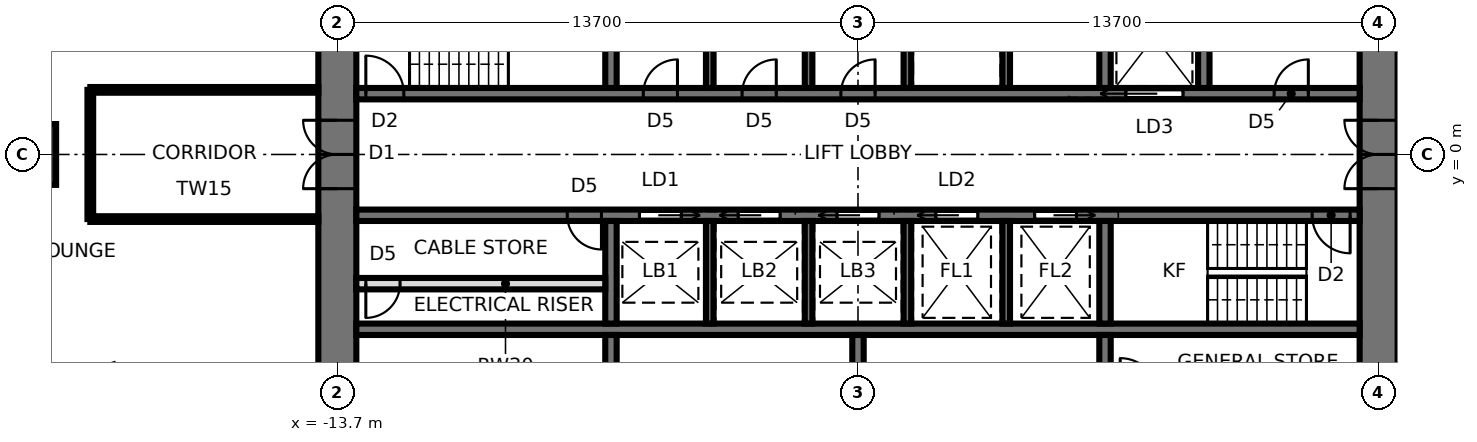
"""IFC4 building model, lengths in metres.
Left out: names, types, materials, properties, quantities, classifications, styles, units other than length and angle.
Written with IfcOpenShell. Run it as: python <this file> out.ifc"""

import sys

from ifc_helpers import new_model, si_unit, direction, frame, frame_2d, origin, origin_2d, place, context, subcontext, project, spatial, rectangle, extrude, element, fill, save


model = new_model("IFC4")
c1 = context("Model", 3, precision=1e-05, world=origin(), true_north=direction((0.0, 1.0)))
c2 = subcontext(c1, "Body", "Model", "MODEL_VIEW")
j1 = project(units=[si_unit("LENGTHUNIT", "METRE"), si_unit("PLANEANGLEUNIT", "RADIAN")], contexts=[c1])
p1 = place(None, origin())
s1 = spatial("IfcSite", under=j1, at=p1, CompositionType="ELEMENT")
p2 = place(p1, origin())
s2 = spatial("IfcBuilding", under=s1, at=p2, CompositionType="ELEMENT")
p3 = place(p2, frame((0.0, 0.0, 162.6)))
s3 = spatial("IfcBuildingStorey", under=s2, at=p3, CompositionType="ELEMENT", Elevation=162.6)
p4 = place(p3, frame((-21.9, 0.0, 0.0), z_axis=(0.0, 0.0, 1.0), x_axis=(-1.0, 0.0, 0.0)))
e1 = element("IfcColumn", 1, at=p4, inside=s3, PredefinedType="COLUMN", context=c2, shape_type="SweptSolid", body=[
    extrude(rectangle(XDim=1.6, YDim=1.6, at=origin_2d()), origin(), (0.0, 0.0, 1.0), 3.9),
])
p5 = place(p3, frame((13.7, -9.5, 0.0), z_axis=(0.0, 0.0, 1.0), x_axis=(0.0, 1.0, 0.0)))
e2 = element("IfcWall", 2, at=p5, inside=s3, PredefinedType="SHEAR", context=c2, shape_type="SweptSolid", body=[
    extrude(rectangle(XDim=19.0, YDim=1.0, at=frame_2d((9.5, 0.0))), origin(), (0.0, 0.0, 1.0), 3.9),
])
p6 = place(p5, frame((8.6, 0.0, 0.0)))
e3 = element("IfcOpeningElement", 3, at=p6, cuts=e2, PredefinedType="OPENING", context=c2, shape_type="SweptSolid", body=[
    extrude(rectangle(XDim=1.8, YDim=2.4, at=frame_2d((0.9, 1.2))), frame((0.0, 0.51, 0.0), z_axis=(0.0, -1.0, 0.0), x_axis=(1.0, 0.0, 0.0)), (0.0, 0.0, 1.0), 1.02),
])
p7 = place(p3, frame((-13.7, 9.5, 0.0), z_axis=(0.0, 0.0, 1.0), x_axis=(0.0, -1.0, 0.0)))
e4 = element("IfcWall", 4, at=p7, inside=s3, PredefinedType="SHEAR", context=c2, shape_type="SweptSolid", body=[
    extrude(rectangle(XDim=19.0, YDim=1.0, at=frame_2d((9.5, 0.0))), origin(), (0.0, 0.0, 1.0), 3.9),
])
p8 = place(p7, frame((8.6, 0.0, 0.0)))
e5 = element("IfcOpeningElement", 5, at=p8, cuts=e4, PredefinedType="OPENING", context=c2, shape_type="SweptSolid", body=[
    extrude(rectangle(XDim=1.8, YDim=2.4, at=frame_2d((0.9, 1.2))), frame((0.0, 0.51, 0.0), z_axis=(0.0, -1.0, 0.0), x_axis=(1.0, 0.0, 0.0)), (0.0, 0.0, 1.0), 1.02),
])
p9 = place(p3, frame((-13.2, 1.6, 0.0), z_axis=(0.0, 0.0, 1.0), x_axis=(1.0, 0.0, 0.0)))
e6 = element("IfcWall", 6, at=p9, inside=s3, PredefinedType="SHEAR", context=c2, shape_type="SweptSolid", body=[
    extrude(rectangle(XDim=26.4, YDim=0.3, at=frame_2d((13.2, 0.0))), origin(), (0.0, 0.0, 1.0), 3.9),
])
p10 = place(p9, frame((0.25, 0.0, 0.0)))
e7 = element("IfcOpeningElement", 7, at=p10, cuts=e6, PredefinedType="OPENING", context=c2, shape_type="SweptSolid", body=[
    extrude(rectangle(XDim=1.0, YDim=2.1, at=frame_2d((0.5, 1.05))), frame((0.0, 0.16, 0.0), z_axis=(0.0, -1.0, 0.0), x_axis=(1.0, 0.0, 0.0)), (0.0, 0.0, 1.0), 0.32),
])
p11 = place(p9, frame((20.25, 0.0, 0.0)))
e8 = element("IfcOpeningElement", 8, at=p11, cuts=e6, PredefinedType="OPENING", context=c2, shape_type="SweptSolid", body=[
    extrude(rectangle(XDim=1.5, YDim=2.4, at=frame_2d((0.75, 1.2))), frame((0.0, 0.16, 0.0), z_axis=(0.0, -1.0, 0.0), x_axis=(1.0, 0.0, 0.0)), (0.0, 0.0, 1.0), 0.32),
])
p12 = place(p9, frame((7.55, 0.0, 0.0)))
e9 = element("IfcOpeningElement", 9, at=p12, cuts=e6, PredefinedType="OPENING", context=c2, shape_type="SweptSolid", body=[
    extrude(rectangle(XDim=0.9, YDim=2.1, at=frame_2d((0.45, 1.05))), frame((0.0, 0.16, 0.0), z_axis=(0.0, -1.0, 0.0), x_axis=(1.0, 0.0, 0.0)), (0.0, 0.0, 1.0), 0.32),
])
p13 = place(p9, frame((10.15, 0.0, 0.0)))
e10 = element("IfcOpeningElement", 10, at=p13, cuts=e6, PredefinedType="OPENING", context=c2, shape_type="SweptSolid", body=[
    extrude(rectangle(XDim=0.9, YDim=2.1, at=frame_2d((0.45, 1.05))), frame((0.0, 0.16, 0.0), z_axis=(0.0, -1.0, 0.0), x_axis=(1.0, 0.0, 0.0)), (0.0, 0.0, 1.0), 0.32),
])
p14 = place(p9, frame((12.75, 0.0, 0.0)))
e11 = element("IfcOpeningElement", 11, at=p14, cuts=e6, PredefinedType="OPENING", context=c2, shape_type="SweptSolid", body=[
    extrude(rectangle(XDim=0.9, YDim=2.1, at=frame_2d((0.45, 1.05))), frame((0.0, 0.16, 0.0), z_axis=(0.0, -1.0, 0.0), x_axis=(1.0, 0.0, 0.0)), (0.0, 0.0, 1.0), 0.32),
])
p15 = place(p9, frame((24.15, 0.0, 0.0)))
e12 = element("IfcOpeningElement", 12, at=p15, cuts=e6, PredefinedType="OPENING", context=c2, shape_type="SweptSolid", body=[
    extrude(rectangle(XDim=0.9, YDim=2.1, at=frame_2d((0.45, 1.05))), frame((0.0, 0.16, 0.0), z_axis=(0.0, -1.0, 0.0), x_axis=(1.0, 0.0, 0.0)), (0.0, 0.0, 1.0), 0.32),
])
p16 = place(p3, frame((-13.2, -1.6, 0.0), z_axis=(0.0, 0.0, 1.0), x_axis=(1.0, 0.0, 0.0)))
e13 = element("IfcWall", 13, at=p16, inside=s3, PredefinedType="SHEAR", context=c2, shape_type="SweptSolid", body=[
    extrude(rectangle(XDim=26.4, YDim=0.3, at=frame_2d((13.2, 0.0))), origin(), (0.0, 0.0, 1.0), 3.9),
])
p17 = place(p16, frame((25.15, 0.0, 0.0)))
e14 = element("IfcOpeningElement", 14, at=p17, cuts=e13, PredefinedType="OPENING", context=c2, shape_type="SweptSolid", body=[
    extrude(rectangle(XDim=1.0, YDim=2.1, at=frame_2d((0.5, 1.05))), frame((0.0, 0.16, 0.0), z_axis=(0.0, -1.0, 0.0), x_axis=(1.0, 0.0, 0.0)), (0.0, 0.0, 1.0), 0.32),
])
p18 = place(p16, frame((7.45, 0.0, 0.0)))
e15 = element("IfcOpeningElement", 15, at=p18, cuts=e13, PredefinedType="OPENING", context=c2, shape_type="SweptSolid", body=[
    extrude(rectangle(XDim=1.1, YDim=2.3, at=frame_2d((0.55, 1.15))), frame((0.0, 0.16, 0.0), z_axis=(0.0, -1.0, 0.0), x_axis=(1.0, 0.0, 0.0)), (0.0, 0.0, 1.0), 0.32),
])
p19 = place(p16, frame((10.05, 0.0, 0.0)))
e16 = element("IfcOpeningElement", 16, at=p19, cuts=e13, PredefinedType="OPENING", context=c2, shape_type="SweptSolid", body=[
    extrude(rectangle(XDim=1.1, YDim=2.3, at=frame_2d((0.55, 1.15))), frame((0.0, 0.16, 0.0), z_axis=(0.0, -1.0, 0.0), x_axis=(1.0, 0.0, 0.0)), (0.0, 0.0, 1.0), 0.32),
])
p20 = place(p16, frame((12.65, 0.0, 0.0)))
e17 = element("IfcOpeningElement", 17, at=p20, cuts=e13, PredefinedType="OPENING", context=c2, shape_type="SweptSolid", body=[
    extrude(rectangle(XDim=1.1, YDim=2.3, at=frame_2d((0.55, 1.15))), frame((0.0, 0.16, 0.0), z_axis=(0.0, -1.0, 0.0), x_axis=(1.0, 0.0, 0.0)), (0.0, 0.0, 1.0), 0.32),
])
p21 = place(p16, frame((15.25, 0.0, 0.0)))
e18 = element("IfcOpeningElement", 18, at=p21, cuts=e13, PredefinedType="OPENING", context=c2, shape_type="SweptSolid", body=[
    extrude(rectangle(XDim=1.1, YDim=2.3, at=frame_2d((0.55, 1.15))), frame((0.0, 0.16, 0.0), z_axis=(0.0, -1.0, 0.0), x_axis=(1.0, 0.0, 0.0)), (0.0, 0.0, 1.0), 0.32),
])
p22 = place(p16, frame((17.85, 0.0, 0.0)))
e19 = element("IfcOpeningElement", 19, at=p22, cuts=e13, PredefinedType="OPENING", context=c2, shape_type="SweptSolid", body=[
    extrude(rectangle(XDim=1.1, YDim=2.3, at=frame_2d((0.55, 1.15))), frame((0.0, 0.16, 0.0), z_axis=(0.0, -1.0, 0.0), x_axis=(1.0, 0.0, 0.0)), (0.0, 0.0, 1.0), 0.32),
])
p23 = place(p16, frame((5.55, 0.0, 0.0)))
e20 = element("IfcOpeningElement", 20, at=p23, cuts=e13, PredefinedType="OPENING", context=c2, shape_type="SweptSolid", body=[
    extrude(rectangle(XDim=0.9, YDim=2.1, at=frame_2d((0.45, 1.05))), frame((0.0, 0.16, 0.0), z_axis=(0.0, -1.0, 0.0), x_axis=(1.0, 0.0, 0.0)), (0.0, 0.0, 1.0), 0.32),
])
p24 = place(p3, frame((-13.2, -4.6, 0.0), z_axis=(0.0, 0.0, 1.0), x_axis=(1.0, 0.0, 0.0)))
e21 = element("IfcWall", 21, at=p24, inside=s3, PredefinedType="SHEAR", context=c2, shape_type="SweptSolid", body=[
    extrude(rectangle(XDim=26.4, YDim=0.3, at=frame_2d((13.2, 0.0))), origin(), (0.0, 0.0, 1.0), 3.9),
])
for number, where, z_axis, x_axis in (
    (22, (-6.5, 1.75, 0.0), (0.0, 0.0, 1.0), (0.0, 1.0, 0.0)),
    (23, (6.5, 1.75, 0.0), (0.0, 0.0, 1.0), (0.0, 1.0, 0.0)),
):
    element("IfcWall", number, at=place(p3, frame(where, z_axis=z_axis, x_axis=x_axis)), inside=s3, PredefinedType="SHEAR", context=c2, shape_type="SweptSolid", body=[
        extrude(rectangle(XDim=2.7, YDim=0.3, at=frame_2d((1.35, 0.0))), origin(), (0.0, 0.0, 1.0), 3.9),
    ])
for number, where, z_axis, x_axis in (
    (24, (-3.9, 1.75, 0.0), (0.0, 0.0, 1.0), (0.0, 1.0, 0.0)),
    (25, (-1.3, 1.75, 0.0), (0.0, 0.0, 1.0), (0.0, 1.0, 0.0)),
    (26, (1.3, 1.75, 0.0), (0.0, 0.0, 1.0), (0.0, 1.0, 0.0)),
    (27, (3.9, 1.75, 0.0), (0.0, 0.0, 1.0), (0.0, 1.0, 0.0)),
):
    element("IfcWall", number, at=place(p3, frame(where, z_axis=z_axis, x_axis=x_axis)), inside=s3, PredefinedType="SHEAR", context=c2, shape_type="SweptSolid", body=[
        extrude(rectangle(XDim=2.7, YDim=0.2, at=frame_2d((1.35, 0.0))), origin(), (0.0, 0.0, 1.0), 3.9),
    ])
p25 = place(p3, frame((-6.5, -1.75, 0.0), z_axis=(0.0, 0.0, 1.0), x_axis=(0.0, -1.0, 0.0)))
e28 = element("IfcWall", 28, at=p25, inside=s3, PredefinedType="SHEAR", context=c2, shape_type="SweptSolid", body=[
    extrude(rectangle(XDim=2.7, YDim=0.3, at=frame_2d((1.35, 0.0))), origin(), (0.0, 0.0, 1.0), 3.9),
])
p26 = place(p3, frame((-6.5, -4.75, 0.0), z_axis=(0.0, 0.0, 1.0), x_axis=(0.0, -1.0, 0.0)))
e29 = element("IfcWall", 29, at=p26, inside=s3, PredefinedType="SHEAR", context=c2, shape_type="SweptSolid", body=[
    extrude(rectangle(XDim=3.75, YDim=0.3, at=frame_2d((1.875, 0.0))), origin(), (0.0, 0.0, 1.0), 3.9),
])
p27 = place(p3, frame((6.5, -1.75, 0.0), z_axis=(0.0, 0.0, 1.0), x_axis=(0.0, -1.0, 0.0)))
e30 = element("IfcWall", 30, at=p27, inside=s3, PredefinedType="SHEAR", context=c2, shape_type="SweptSolid", body=[
    extrude(rectangle(XDim=2.7, YDim=0.3, at=frame_2d((1.35, 0.0))), origin(), (0.0, 0.0, 1.0), 3.9),
])
p28 = place(p3, frame((6.5, -4.75, 0.0), z_axis=(0.0, 0.0, 1.0), x_axis=(0.0, -1.0, 0.0)))
e31 = element("IfcWall", 31, at=p28, inside=s3, PredefinedType="SHEAR", context=c2, shape_type="SweptSolid", body=[
    extrude(rectangle(XDim=3.75, YDim=0.3, at=frame_2d((1.875, 0.0))), origin(), (0.0, 0.0, 1.0), 3.9),
])
for number, where, z_axis, x_axis in (
    (32, (-3.9, -1.75, 0.0), (0.0, 0.0, 1.0), (0.0, -1.0, 0.0)),
    (33, (-1.3, -1.75, 0.0), (0.0, 0.0, 1.0), (0.0, -1.0, 0.0)),
    (34, (1.3, -1.75, 0.0), (0.0, 0.0, 1.0), (0.0, -1.0, 0.0)),
    (35, (3.9, -1.75, 0.0), (0.0, 0.0, 1.0), (0.0, -1.0, 0.0)),
):
    element("IfcWall", number, at=place(p3, frame(where, z_axis=z_axis, x_axis=x_axis)), inside=s3, PredefinedType="SHEAR", context=c2, shape_type="SweptSolid", body=[
        extrude(rectangle(XDim=2.7, YDim=0.2, at=frame_2d((1.35, 0.0))), origin(), (0.0, 0.0, 1.0), 3.9),
    ])
p29 = place(p3, frame((0.0, -4.75, 0.0), z_axis=(0.0, 0.0, 1.0), x_axis=(0.0, -1.0, 0.0)))
e36 = element("IfcWall", 36, at=p29, inside=s3, PredefinedType="SHEAR", context=c2, shape_type="SweptSolid", body=[
    extrude(rectangle(XDim=3.75, YDim=0.3, at=frame_2d((1.875, 0.0))), origin(), (0.0, 0.0, 1.0), 3.9),
])
p30 = place(p3, frame((9.1, 1.75, 0.0), z_axis=(0.0, 0.0, 1.0), x_axis=(0.0, 1.0, 0.0)))
e37 = element("IfcWall", 37, at=p30, inside=s3, PredefinedType="SHEAR", context=c2, shape_type="SweptSolid", body=[
    extrude(rectangle(XDim=2.7, YDim=0.3, at=frame_2d((1.35, 0.0))), origin(), (0.0, 0.0, 1.0), 3.9),
])
p31 = place(p3, frame((-13.2, -3.4, 0.0), z_axis=(0.0, 0.0, 1.0), x_axis=(1.0, 0.0, 0.0)))
e38 = element("IfcWall", 38, at=p31, inside=s3, PredefinedType="SOLIDWALL", context=c2, shape_type="SweptSolid", body=[
    extrude(rectangle(XDim=6.55, YDim=0.3, at=frame_2d((3.275, 0.0))), origin(), (0.0, 0.0, 1.0), 3.7),
])
p32 = place(p31, frame((0.25, 0.0, 0.0)))
e39 = element("IfcOpeningElement", 39, at=p32, cuts=e38, PredefinedType="OPENING", context=c2, shape_type="SweptSolid", body=[
    extrude(rectangle(XDim=0.9, YDim=2.1, at=frame_2d((0.45, 1.05))), frame((0.0, 0.16, 0.0), z_axis=(0.0, -1.0, 0.0), x_axis=(1.0, 0.0, 0.0)), (0.0, 0.0, 1.0), 0.32),
])
for number, where, z_axis, x_axis in (
    (40, (-20.2, -1.7, 0.0), (0.0, 0.0, 1.0), (1.0, 0.0, 0.0)),
    (41, (-14.2, 1.7, 0.0), (0.0, 0.0, 1.0), (-1.0, 0.0, 0.0)),
):
    element("IfcWall", number, at=place(p3, frame(where, z_axis=z_axis, x_axis=x_axis)), inside=s3, PredefinedType="PARTITIONING", context=c2, shape_type="SweptSolid", body=[
        extrude(rectangle(XDim=6.0, YDim=0.15, at=frame_2d((3.0, 0.0))), origin(), (0.0, 0.0, 1.0), 3.7),
    ])
p33 = place(p3, frame((-20.2, 1.7, 0.0), z_axis=(0.0, 0.0, 1.0), x_axis=(0.0, -1.0, 0.0)))
e42 = element("IfcWall", 42, at=p33, inside=s3, PredefinedType="PARTITIONING", context=c2, shape_type="SweptSolid", body=[
    extrude(rectangle(XDim=3.4, YDim=0.15, at=frame_2d((1.7, 0.0))), origin(), (0.0, 0.0, 1.0), 3.7),
])
p34 = place(p8, frame((1.8, 0.0, 0.0), z_axis=(0.0, 0.0, 1.0), x_axis=(-1.0, 0.0, 0.0)))
e43 = element("IfcDoor", 43, at=p34, inside=s3, OperationType="DOUBLE_DOOR_SINGLE_SWING", PredefinedType="DOOR", context=c2, shape_type="SweptSolid", body=[
    extrude(rectangle(XDim=1.72, YDim=2.36, at=frame_2d((0.9, 1.18))), frame((0.0, 0.025, 0.0), z_axis=(0.0, -1.0, 0.0), x_axis=(1.0, 0.0, 0.0)), (0.0, 0.0, 1.0), 0.05),
    extrude(rectangle(XDim=0.04, YDim=2.4, at=frame_2d((1.78, 1.2))), frame((0.0, 0.25, 0.0), z_axis=(0.0, -1.0, 0.0), x_axis=(1.0, 0.0, 0.0)), (0.0, 0.0, 1.0), 0.5),
    extrude(rectangle(XDim=0.04, YDim=2.4, at=frame_2d((0.02, 1.2))), frame((0.0, 0.25, 0.0), z_axis=(0.0, -1.0, 0.0), x_axis=(1.0, 0.0, 0.0)), (0.0, 0.0, 1.0), 0.5),
    extrude(rectangle(XDim=1.72, YDim=0.04, at=frame_2d((0.9, 2.38))), frame((0.0, 0.25, 0.0), z_axis=(0.0, -1.0, 0.0), x_axis=(1.0, 0.0, 0.0)), (0.0, 0.0, 1.0), 0.5),
])
fill(e5, e43)
p35 = place(p6, origin())
e44 = element("IfcDoor", 44, at=p35, inside=s3, OperationType="DOUBLE_DOOR_SINGLE_SWING", PredefinedType="DOOR", context=c2, shape_type="SweptSolid", body=[
    extrude(rectangle(XDim=1.72, YDim=2.36, at=frame_2d((0.9, 1.18))), frame((0.0, 0.025, 0.0), z_axis=(0.0, -1.0, 0.0), x_axis=(1.0, 0.0, 0.0)), (0.0, 0.0, 1.0), 0.05),
    extrude(rectangle(XDim=0.04, YDim=2.4, at=frame_2d((0.02, 1.2))), frame((0.0, 0.25, 0.0), z_axis=(0.0, -1.0, 0.0), x_axis=(1.0, 0.0, 0.0)), (0.0, 0.0, 1.0), 0.5),
    extrude(rectangle(XDim=0.04, YDim=2.4, at=frame_2d((1.78, 1.2))), frame((0.0, 0.25, 0.0), z_axis=(0.0, -1.0, 0.0), x_axis=(1.0, 0.0, 0.0)), (0.0, 0.0, 1.0), 0.5),
    extrude(rectangle(XDim=1.72, YDim=0.04, at=frame_2d((0.9, 2.38))), frame((0.0, 0.25, 0.0), z_axis=(0.0, -1.0, 0.0), x_axis=(1.0, 0.0, 0.0)), (0.0, 0.0, 1.0), 0.5),
])
fill(e3, e44)
p36 = place(p10, origin())
e45 = element("IfcDoor", 45, at=p36, inside=s3, OperationType="SINGLE_SWING_LEFT", PredefinedType="DOOR", context=c2, shape_type="SweptSolid", body=[
    extrude(rectangle(XDim=1.0, YDim=2.1, at=frame_2d((0.5, 1.05))), frame((0.0, 0.025, 0.0), z_axis=(0.0, -1.0, 0.0), x_axis=(1.0, 0.0, 0.0)), (0.0, 0.0, 1.0), 0.05),
])
fill(e7, e45)
p37 = place(p17, frame((1.0, 0.0, 0.0), z_axis=(0.0, 0.0, 1.0), x_axis=(-1.0, 0.0, 0.0)))
e46 = element("IfcDoor", 46, at=p37, inside=s3, OperationType="SINGLE_SWING_LEFT", PredefinedType="DOOR", context=c2, shape_type="SweptSolid", body=[
    extrude(rectangle(XDim=1.0, YDim=2.1, at=frame_2d((0.5, 1.05))), frame((0.0, 0.025, 0.0), z_axis=(0.0, -1.0, 0.0), x_axis=(1.0, 0.0, 0.0)), (0.0, 0.0, 1.0), 0.05),
])
fill(e14, e46)
p38 = place(p11, origin())
e47 = element("IfcDoor", 47, at=p38, inside=s3, OperationType="SLIDING_TO_LEFT", PredefinedType="DOOR", context=c2, shape_type="SweptSolid", body=[
    extrude(rectangle(XDim=1.5, YDim=2.4, at=frame_2d((0.75, 1.2))), frame((0.0, 0.025, 0.0), z_axis=(0.0, -1.0, 0.0), x_axis=(1.0, 0.0, 0.0)), (0.0, 0.0, 1.0), 0.05),
])
fill(e8, e47)
p39 = place(p12, origin())
e48 = element("IfcDoor", 48, at=p39, inside=s3, OperationType="SINGLE_SWING_RIGHT", PredefinedType="DOOR", context=c2, shape_type="SweptSolid", body=[
    extrude(rectangle(XDim=0.9, YDim=2.1, at=frame_2d((0.45, 1.05))), frame((0.0, 0.025, 0.0), z_axis=(0.0, -1.0, 0.0), x_axis=(1.0, 0.0, 0.0)), (0.0, 0.0, 1.0), 0.05),
])
fill(e9, e48)
p40 = place(p13, origin())
e49 = element("IfcDoor", 49, at=p40, inside=s3, OperationType="SINGLE_SWING_RIGHT", PredefinedType="DOOR", context=c2, shape_type="SweptSolid", body=[
    extrude(rectangle(XDim=0.9, YDim=2.1, at=frame_2d((0.45, 1.05))), frame((0.0, 0.025, 0.0), z_axis=(0.0, -1.0, 0.0), x_axis=(1.0, 0.0, 0.0)), (0.0, 0.0, 1.0), 0.05),
])
fill(e10, e49)
p41 = place(p14, origin())
e50 = element("IfcDoor", 50, at=p41, inside=s3, OperationType="SINGLE_SWING_RIGHT", PredefinedType="DOOR", context=c2, shape_type="SweptSolid", body=[
    extrude(rectangle(XDim=0.9, YDim=2.1, at=frame_2d((0.45, 1.05))), frame((0.0, 0.025, 0.0), z_axis=(0.0, -1.0, 0.0), x_axis=(1.0, 0.0, 0.0)), (0.0, 0.0, 1.0), 0.05),
])
fill(e11, e50)
p42 = place(p18, frame((1.1, 0.0, 0.0), z_axis=(0.0, 0.0, 1.0), x_axis=(-1.0, 0.0, 0.0)))
e51 = element("IfcDoor", 51, at=p42, inside=s3, OperationType="SLIDING_TO_LEFT", PredefinedType="DOOR", context=c2, shape_type="SweptSolid", body=[
    extrude(rectangle(XDim=1.1, YDim=2.3, at=frame_2d((0.55, 1.15))), frame((0.0, 0.025, 0.0), z_axis=(0.0, -1.0, 0.0), x_axis=(1.0, 0.0, 0.0)), (0.0, 0.0, 1.0), 0.05),
])
fill(e15, e51)
p43 = place(p19, frame((1.1, 0.0, 0.0), z_axis=(0.0, 0.0, 1.0), x_axis=(-1.0, 0.0, 0.0)))
e52 = element("IfcDoor", 52, at=p43, inside=s3, OperationType="SLIDING_TO_RIGHT", PredefinedType="DOOR", context=c2, shape_type="SweptSolid", body=[
    extrude(rectangle(XDim=1.1, YDim=2.3, at=frame_2d((0.55, 1.15))), frame((0.0, 0.025, 0.0), z_axis=(0.0, -1.0, 0.0), x_axis=(1.0, 0.0, 0.0)), (0.0, 0.0, 1.0), 0.05),
])
fill(e16, e52)
p44 = place(p20, frame((1.1, 0.0, 0.0), z_axis=(0.0, 0.0, 1.0), x_axis=(-1.0, 0.0, 0.0)))
e53 = element("IfcDoor", 53, at=p44, inside=s3, OperationType="SLIDING_TO_RIGHT", PredefinedType="DOOR", context=c2, shape_type="SweptSolid", body=[
    extrude(rectangle(XDim=1.1, YDim=2.3, at=frame_2d((0.55, 1.15))), frame((0.0, 0.025, 0.0), z_axis=(0.0, -1.0, 0.0), x_axis=(1.0, 0.0, 0.0)), (0.0, 0.0, 1.0), 0.05),
])
fill(e17, e53)
p45 = place(p21, frame((1.1, 0.0, 0.0), z_axis=(0.0, 0.0, 1.0), x_axis=(-1.0, 0.0, 0.0)))
e54 = element("IfcDoor", 54, at=p45, inside=s3, OperationType="SLIDING_TO_RIGHT", PredefinedType="DOOR", context=c2, shape_type="SweptSolid", body=[
    extrude(rectangle(XDim=1.1, YDim=2.3, at=frame_2d((0.55, 1.15))), frame((0.0, 0.025, 0.0), z_axis=(0.0, -1.0, 0.0), x_axis=(1.0, 0.0, 0.0)), (0.0, 0.0, 1.0), 0.05),
])
fill(e18, e54)
p46 = place(p22, frame((1.1, 0.0, 0.0), z_axis=(0.0, 0.0, 1.0), x_axis=(-1.0, 0.0, 0.0)))
e55 = element("IfcDoor", 55, at=p46, inside=s3, OperationType="SLIDING_TO_LEFT", PredefinedType="DOOR", context=c2, shape_type="SweptSolid", body=[
    extrude(rectangle(XDim=1.1, YDim=2.3, at=frame_2d((0.55, 1.15))), frame((0.0, 0.025, 0.0), z_axis=(0.0, -1.0, 0.0), x_axis=(1.0, 0.0, 0.0)), (0.0, 0.0, 1.0), 0.05),
])
fill(e19, e55)
p47 = place(p15, origin())
e56 = element("IfcDoor", 56, at=p47, inside=s3, OperationType="SINGLE_SWING_RIGHT", PredefinedType="DOOR", context=c2, shape_type="SweptSolid", body=[
    extrude(rectangle(XDim=0.9, YDim=2.1, at=frame_2d((0.45, 1.05))), frame((0.0, 0.025, 0.0), z_axis=(0.0, -1.0, 0.0), x_axis=(1.0, 0.0, 0.0)), (0.0, 0.0, 1.0), 0.05),
])
fill(e12, e56)
p48 = place(p23, frame((0.9, 0.0, 0.0), z_axis=(0.0, 0.0, 1.0), x_axis=(-1.0, 0.0, 0.0)))
e57 = element("IfcDoor", 57, at=p48, inside=s3, OperationType="SINGLE_SWING_LEFT", PredefinedType="DOOR", context=c2, shape_type="SweptSolid", body=[
    extrude(rectangle(XDim=0.9, YDim=2.1, at=frame_2d((0.45, 1.05))), frame((0.0, 0.025, 0.0), z_axis=(0.0, -1.0, 0.0), x_axis=(1.0, 0.0, 0.0)), (0.0, 0.0, 1.0), 0.05),
])
fill(e20, e57)
p49 = place(p32, frame((0.9, 0.0, 0.0), z_axis=(0.0, 0.0, 1.0), x_axis=(-1.0, 0.0, 0.0)))
e58 = element("IfcDoor", 58, at=p49, inside=s3, OperationType="SINGLE_SWING_RIGHT", PredefinedType="DOOR", context=c2, shape_type="SweptSolid", body=[
    extrude(rectangle(XDim=0.9, YDim=2.1, at=frame_2d((0.45, 1.05))), frame((0.0, 0.025, 0.0), z_axis=(0.0, -1.0, 0.0), x_axis=(1.0, 0.0, 0.0)), (0.0, 0.0, 1.0), 0.05),
])
fill(e39, e58)
save(model, sys.argv[1])
